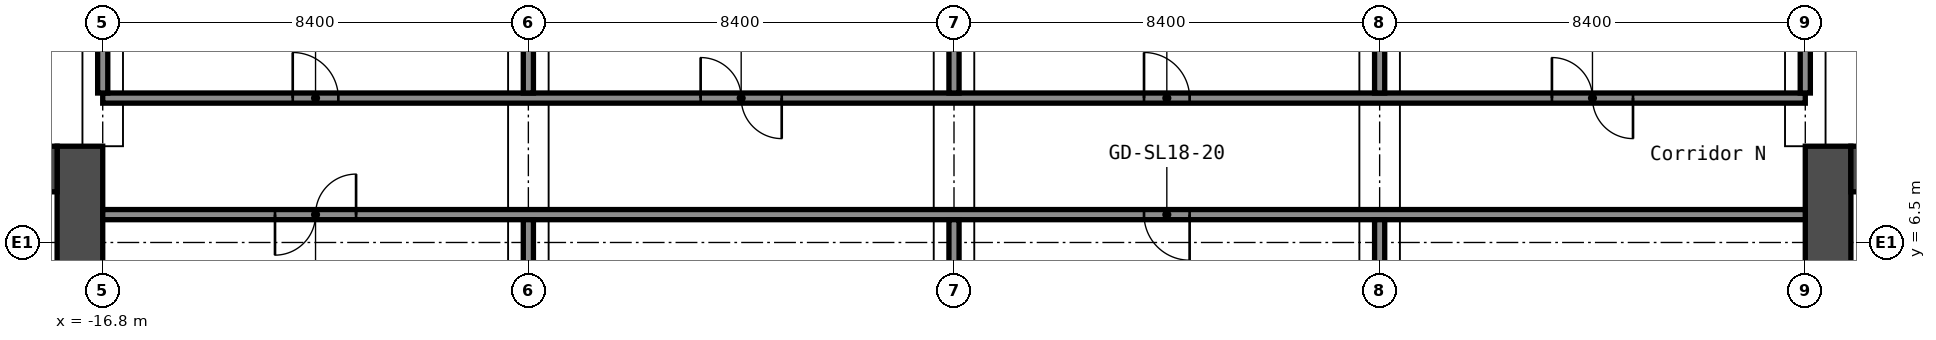
"""IFC4 building model, lengths in metres.
Left out: names, types, materials, properties, quantities, classifications, styles, units other than length and angle.
Written with IfcOpenShell. Run it as: python <this file> out.ifc"""

import sys

from ifc_helpers import new_model, si_unit, direction, frame, frame_2d, origin, place, context, subcontext, project, spatial, rectangle, extrude, element, fill, save


model = new_model("IFC4")
c1 = context("Model", 3, precision=1e-05, world=origin(), true_north=direction((0.0, 1.0)))
c2 = subcontext(c1, "Body", "Model", "MODEL_VIEW")
j1 = project(units=[si_unit("LENGTHUNIT", "METRE"), si_unit("PLANEANGLEUNIT", "RADIAN")], contexts=[c1])
p1 = place(None, origin())
s1 = spatial("IfcSite", under=j1, at=p1, CompositionType="ELEMENT")
p2 = place(p1, origin())
s2 = spatial("IfcBuilding", under=s1, at=p2, CompositionType="ELEMENT")
p3 = place(p2, frame((0.0, 0.0, 64.6)))
s3 = spatial("IfcBuildingStorey", under=s2, at=p3, CompositionType="ELEMENT", Elevation=64.6)
p4 = place(p3, frame((-17.25, -8.4, 0.0), z_axis=(0.0, 0.0, 1.0), x_axis=(0.0, 1.0, 0.0)))
e1 = element("IfcWall", 1, at=p4, inside=s3, PredefinedType="SHEAR", context=c2, shape_type="SweptSolid", body=[
    extrude(rectangle(XDim=16.8, YDim=0.9, at=frame_2d((8.4, 0.0))), origin(), (0.0, 0.0, 1.0), 4.1),
])
p5 = place(p4, frame((7.6, 0.0, 0.0)))
e2 = element("IfcOpeningElement", 2, at=p5, cuts=e1, PredefinedType="OPENING", context=c2, shape_type="SweptSolid", body=[
    extrude(rectangle(XDim=1.2, YDim=2.1, at=frame_2d((0.6, 1.05))), frame((0.0, 0.46, 0.0), z_axis=(0.0, -1.0, 0.0), x_axis=(1.0, 0.0, 0.0)), (0.0, 0.0, 1.0), 0.92),
])
p6 = place(p3, frame((-32.7, 7.95, 0.0), z_axis=(0.0, 0.0, 1.0), x_axis=(1.0, 0.0, 0.0)))
e3 = element("IfcWall", 3, at=p6, inside=s3, PredefinedType="SHEAR", context=c2, shape_type="SweptSolid", body=[
    extrude(rectangle(XDim=15.0, YDim=0.9, at=frame_2d((7.5, 0.0))), origin(), (0.0, 0.0, 1.0), 4.1),
])
p7 = place(p6, frame((3.4, 0.0, 0.0)))
e4 = element("IfcOpeningElement", 4, at=p7, cuts=e3, PredefinedType="OPENING", context=c2, shape_type="SweptSolid", body=[
    extrude(rectangle(XDim=1.2, YDim=2.1, at=frame_2d((0.6, 1.05))), frame((0.0, 0.46, 0.0), z_axis=(0.0, -1.0, 0.0), x_axis=(1.0, 0.0, 0.0)), (0.0, 0.0, 1.0), 0.92),
])
p8 = place(p6, frame((0.75, 0.0, 0.0)))
e5 = element("IfcOpeningElement", 5, at=p8, cuts=e3, PredefinedType="OPENING", context=c2, shape_type="SweptSolid", body=[
    extrude(rectangle(XDim=0.9, YDim=2.1, at=frame_2d((0.45, 1.05))), frame((0.0, 0.46, 0.0), z_axis=(0.0, -1.0, 0.0), x_axis=(1.0, 0.0, 0.0)), (0.0, 0.0, 1.0), 0.92),
])
p9 = place(p3, frame((17.25, -8.4, 0.0), z_axis=(0.0, 0.0, 1.0), x_axis=(0.0, 1.0, 0.0)))
e6 = element("IfcWall", 6, at=p9, inside=s3, PredefinedType="SHEAR", context=c2, shape_type="SweptSolid", body=[
    extrude(rectangle(XDim=16.8, YDim=0.9, at=frame_2d((8.4, 0.0))), origin(), (0.0, 0.0, 1.0), 4.1),
])
p10 = place(p9, frame((7.6, 0.0, 0.0)))
e7 = element("IfcOpeningElement", 7, at=p10, cuts=e6, PredefinedType="OPENING", context=c2, shape_type="SweptSolid", body=[
    extrude(rectangle(XDim=1.2, YDim=2.1, at=frame_2d((0.6, 1.05))), frame((0.0, 0.46, 0.0), z_axis=(0.0, -1.0, 0.0), x_axis=(1.0, 0.0, 0.0)), (0.0, 0.0, 1.0), 0.92),
])
p11 = place(p3, frame((17.7, 7.95, 0.0), z_axis=(0.0, 0.0, 1.0), x_axis=(1.0, 0.0, 0.0)))
e8 = element("IfcWall", 8, at=p11, inside=s3, PredefinedType="SHEAR", context=c2, shape_type="SweptSolid", body=[
    extrude(rectangle(XDim=15.0, YDim=0.9, at=frame_2d((7.5, 0.0))), origin(), (0.0, 0.0, 1.0), 4.1),
])
p12 = place(p11, frame((10.4, 0.0, 0.0)))
e9 = element("IfcOpeningElement", 9, at=p12, cuts=e8, PredefinedType="OPENING", context=c2, shape_type="SweptSolid", body=[
    extrude(rectangle(XDim=1.2, YDim=2.1, at=frame_2d((0.6, 1.05))), frame((0.0, 0.46, 0.0), z_axis=(0.0, -1.0, 0.0), x_axis=(1.0, 0.0, 0.0)), (0.0, 0.0, 1.0), 0.92),
])
p13 = place(p11, frame((13.35, 0.0, 0.0)))
e10 = element("IfcOpeningElement", 10, at=p13, cuts=e8, PredefinedType="OPENING", context=c2, shape_type="SweptSolid", body=[
    extrude(rectangle(XDim=0.9, YDim=2.1, at=frame_2d((0.45, 1.05))), frame((0.0, 0.46, 0.0), z_axis=(0.0, -1.0, 0.0), x_axis=(1.0, 0.0, 0.0)), (0.0, 0.0, 1.0), 0.92),
])
p14 = place(p3, frame((-16.8, 7.05, 0.0), z_axis=(0.0, 0.0, 1.0), x_axis=(1.0, 0.0, 0.0)))
e11 = element("IfcWall", 11, at=p14, inside=s3, PredefinedType="PARTITIONING", context=c2, shape_type="SweptSolid", body=[
    extrude(rectangle(XDim=33.6, YDim=0.2, at=frame_2d((16.8, 0.0))), origin(), (0.0, 0.0, 1.0), 4.1),
])
p15 = place(p14, frame((3.4, 0.0, 0.0)))
e12 = element("IfcOpeningElement", 12, at=p15, cuts=e11, PredefinedType="OPENING", context=c2, shape_type="SweptSolid", body=[
    extrude(rectangle(XDim=1.6, YDim=2.1, at=frame_2d((0.8, 1.05))), frame((0.0, 0.11, 0.0), z_axis=(0.0, -1.0, 0.0), x_axis=(1.0, 0.0, 0.0)), (0.0, 0.0, 1.0), 0.22),
])
p16 = place(p14, frame((20.55, 0.0, 0.0)))
e13 = element("IfcOpeningElement", 13, at=p16, cuts=e11, PredefinedType="OPENING", context=c2, shape_type="SweptSolid", body=[
    extrude(rectangle(XDim=0.9, YDim=2.1, at=frame_2d((0.45, 1.05))), frame((0.0, 0.11, 0.0), z_axis=(0.0, -1.0, 0.0), x_axis=(1.0, 0.0, 0.0)), (0.0, 0.0, 1.0), 0.22),
])
p17 = place(p3, frame((-16.8, 9.35, 0.0), z_axis=(0.0, 0.0, 1.0), x_axis=(1.0, 0.0, 0.0)))
e14 = element("IfcWall", 14, at=p17, inside=s3, PredefinedType="PARTITIONING", context=c2, shape_type="SweptSolid", body=[
    extrude(rectangle(XDim=33.6, YDim=0.2, at=frame_2d((16.8, 0.0))), origin(), (0.0, 0.0, 1.0), 4.1),
])
p18 = place(p17, frame((3.75, 0.0, 0.0)))
e15 = element("IfcOpeningElement", 15, at=p18, cuts=e14, PredefinedType="OPENING", context=c2, shape_type="SweptSolid", body=[
    extrude(rectangle(XDim=0.9, YDim=2.1, at=frame_2d((0.45, 1.05))), frame((0.0, 0.11, 0.0), z_axis=(0.0, -1.0, 0.0), x_axis=(1.0, 0.0, 0.0)), (0.0, 0.0, 1.0), 0.22),
])
p19 = place(p17, frame((11.8, 0.0, 0.0)))
e16 = element("IfcOpeningElement", 16, at=p19, cuts=e14, PredefinedType="OPENING", context=c2, shape_type="SweptSolid", body=[
    extrude(rectangle(XDim=1.6, YDim=2.1, at=frame_2d((0.8, 1.05))), frame((0.0, 0.11, 0.0), z_axis=(0.0, -1.0, 0.0), x_axis=(1.0, 0.0, 0.0)), (0.0, 0.0, 1.0), 0.22),
])
p20 = place(p17, frame((20.55, 0.0, 0.0)))
e17 = element("IfcOpeningElement", 17, at=p20, cuts=e14, PredefinedType="OPENING", context=c2, shape_type="SweptSolid", body=[
    extrude(rectangle(XDim=0.9, YDim=2.1, at=frame_2d((0.45, 1.05))), frame((0.0, 0.11, 0.0), z_axis=(0.0, -1.0, 0.0), x_axis=(1.0, 0.0, 0.0)), (0.0, 0.0, 1.0), 0.22),
])
p21 = place(p17, frame((28.6, 0.0, 0.0)))
e18 = element("IfcOpeningElement", 18, at=p21, cuts=e14, PredefinedType="OPENING", context=c2, shape_type="SweptSolid", body=[
    extrude(rectangle(XDim=1.6, YDim=2.1, at=frame_2d((0.8, 1.05))), frame((0.0, 0.11, 0.0), z_axis=(0.0, -1.0, 0.0), x_axis=(1.0, 0.0, 0.0)), (0.0, 0.0, 1.0), 0.22),
])
p22 = place(p3, frame((-16.8, 9.45, 0.0), z_axis=(0.0, 0.0, 1.0), x_axis=(0.0, 1.0, 0.0)))
e19 = element("IfcWall", 19, at=p22, inside=s3, PredefinedType="PARTITIONING", context=c2, shape_type="SweptSolid", body=[
    extrude(rectangle(XDim=14.1, YDim=0.2, at=frame_2d((7.05, 0.0))), origin(), (0.0, 0.0, 1.0), 4.1),
])
p23 = place(p3, frame((-8.4, 1.05, 0.0), z_axis=(0.0, 0.0, 1.0), x_axis=(0.0, 1.0, 0.0)))
e20 = element("IfcWall", 20, at=p23, inside=s3, PredefinedType="PARTITIONING", context=c2, shape_type="SweptSolid", body=[
    extrude(rectangle(XDim=5.9, YDim=0.2, at=frame_2d((2.95, 0.0))), origin(), (0.0, 0.0, 1.0), 4.1),
])
p24 = place(p3, frame((-8.4, 9.45, 0.0), z_axis=(0.0, 0.0, 1.0), x_axis=(0.0, 1.0, 0.0)))
e21 = element("IfcWall", 21, at=p24, inside=s3, PredefinedType="PARTITIONING", context=c2, shape_type="SweptSolid", body=[
    extrude(rectangle(XDim=14.1, YDim=0.2, at=frame_2d((7.05, 0.0))), origin(), (0.0, 0.0, 1.0), 4.1),
])
p25 = place(p3, frame((0.0, 1.05, 0.0), z_axis=(0.0, 0.0, 1.0), x_axis=(0.0, 1.0, 0.0)))
e22 = element("IfcWall", 22, at=p25, inside=s3, PredefinedType="PARTITIONING", context=c2, shape_type="SweptSolid", body=[
    extrude(rectangle(XDim=5.9, YDim=0.2, at=frame_2d((2.95, 0.0))), origin(), (0.0, 0.0, 1.0), 4.1),
])
p26 = place(p3, frame((0.0, 9.45, 0.0), z_axis=(0.0, 0.0, 1.0), x_axis=(0.0, 1.0, 0.0)))
e23 = element("IfcWall", 23, at=p26, inside=s3, PredefinedType="PARTITIONING", context=c2, shape_type="SweptSolid", body=[
    extrude(rectangle(XDim=14.1, YDim=0.2, at=frame_2d((7.05, 0.0))), origin(), (0.0, 0.0, 1.0), 4.1),
])
p27 = place(p3, frame((8.4, 1.05, 0.0), z_axis=(0.0, 0.0, 1.0), x_axis=(0.0, 1.0, 0.0)))
e24 = element("IfcWall", 24, at=p27, inside=s3, PredefinedType="PARTITIONING", context=c2, shape_type="SweptSolid", body=[
    extrude(rectangle(XDim=5.9, YDim=0.2, at=frame_2d((2.95, 0.0))), origin(), (0.0, 0.0, 1.0), 4.1),
])
for number, where, z_axis, x_axis in (
    (25, (8.4, 9.45, 0.0), (0.0, 0.0, 1.0), (0.0, 1.0, 0.0)),
    (26, (16.8, 9.45, 0.0), (0.0, 0.0, 1.0), (0.0, 1.0, 0.0)),
):
    element("IfcWall", number, at=place(p3, frame(where, z_axis=z_axis, x_axis=x_axis)), inside=s3, PredefinedType="PARTITIONING", context=c2, shape_type="SweptSolid", body=[
        extrude(rectangle(XDim=14.1, YDim=0.2, at=frame_2d((7.05, 0.0))), origin(), (0.0, 0.0, 1.0), 4.1),
    ])
p28 = place(p15, origin())
e27 = element("IfcDoor", 27, at=p28, inside=s3, OperationType="DOUBLE_DOOR_SINGLE_SWING", PredefinedType="DOOR", context=c2, shape_type="SweptSolid", body=[
    extrude(rectangle(XDim=1.6, YDim=2.1, at=frame_2d((0.8, 1.05))), frame((0.0, 0.025, 0.0), z_axis=(0.0, -1.0, 0.0), x_axis=(1.0, 0.0, 0.0)), (0.0, 0.0, 1.0), 0.05),
])
fill(e12, e27)
p29 = place(p16, origin())
e28 = element("IfcDoor", 28, at=p29, inside=s3, OperationType="SINGLE_SWING_RIGHT", PredefinedType="DOOR", context=c2, shape_type="SweptSolid", body=[
    extrude(rectangle(XDim=0.9, YDim=2.1, at=frame_2d((0.45, 1.05))), frame((0.0, 0.025, 0.0), z_axis=(0.0, -1.0, 0.0), x_axis=(1.0, 0.0, 0.0)), (0.0, 0.0, 1.0), 0.05),
])
fill(e13, e28)
p30 = place(p18, origin())
e29 = element("IfcDoor", 29, at=p30, inside=s3, OperationType="SINGLE_SWING_RIGHT", PredefinedType="DOOR", context=c2, shape_type="SweptSolid", body=[
    extrude(rectangle(XDim=0.9, YDim=2.1, at=frame_2d((0.45, 1.05))), frame((0.0, 0.025, 0.0), z_axis=(0.0, -1.0, 0.0), x_axis=(1.0, 0.0, 0.0)), (0.0, 0.0, 1.0), 0.05),
])
fill(e15, e29)
p31 = place(p19, origin())
e30 = element("IfcDoor", 30, at=p31, inside=s3, OperationType="DOUBLE_DOOR_SINGLE_SWING", PredefinedType="DOOR", context=c2, shape_type="SweptSolid", body=[
    extrude(rectangle(XDim=1.6, YDim=2.1, at=frame_2d((0.8, 1.05))), frame((0.0, 0.025, 0.0), z_axis=(0.0, -1.0, 0.0), x_axis=(1.0, 0.0, 0.0)), (0.0, 0.0, 1.0), 0.05),
])
fill(e16, e30)
p32 = place(p20, origin())
e31 = element("IfcDoor", 31, at=p32, inside=s3, OperationType="SINGLE_SWING_RIGHT", PredefinedType="DOOR", context=c2, shape_type="SweptSolid", body=[
    extrude(rectangle(XDim=0.9, YDim=2.1, at=frame_2d((0.45, 1.05))), frame((0.0, 0.025, 0.0), z_axis=(0.0, -1.0, 0.0), x_axis=(1.0, 0.0, 0.0)), (0.0, 0.0, 1.0), 0.05),
])
fill(e17, e31)
p33 = place(p21, origin())
e32 = element("IfcDoor", 32, at=p33, inside=s3, OperationType="DOUBLE_DOOR_SINGLE_SWING", PredefinedType="DOOR", context=c2, shape_type="SweptSolid", body=[
    extrude(rectangle(XDim=1.6, YDim=2.1, at=frame_2d((0.8, 1.05))), frame((0.0, 0.025, 0.0), z_axis=(0.0, -1.0, 0.0), x_axis=(1.0, 0.0, 0.0)), (0.0, 0.0, 1.0), 0.05),
])
fill(e18, e32)
save(model, sys.argv[1])
